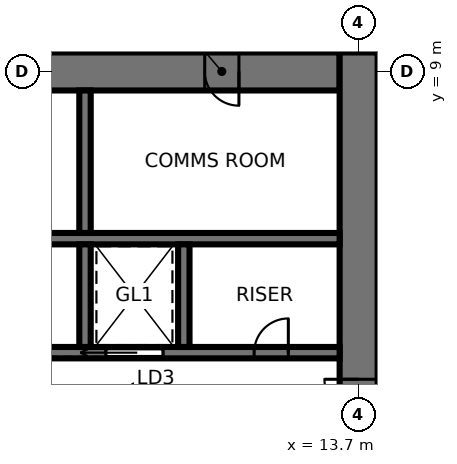
"""IFC4 building model, lengths in metres.
Left out: names, types, materials, properties, quantities, classifications, styles, units other than length and angle.
Written with IfcOpenShell. Run it as: python <this file> out.ifc"""

import sys

from ifc_helpers import new_model, si_unit, direction, frame, frame_2d, origin, place, context, subcontext, project, spatial, rectangle, extrude, element, fill, save


model = new_model("IFC4")
c1 = context("Model", 3, precision=1e-05, world=origin(), true_north=direction((0.0, 1.0)))
c2 = subcontext(c1, "Body", "Model", "MODEL_VIEW")
j1 = project(units=[si_unit("LENGTHUNIT", "METRE"), si_unit("PLANEANGLEUNIT", "RADIAN")], contexts=[c1])
p1 = place(None, origin())
s1 = spatial("IfcSite", under=j1, at=p1, CompositionType="ELEMENT")
p2 = place(p1, origin())
s2 = spatial("IfcBuilding", under=s1, at=p2, CompositionType="ELEMENT")
p3 = place(p2, frame((0.0, 0.0, 127.5)))
s3 = spatial("IfcBuildingStorey", under=s2, at=p3, CompositionType="ELEMENT", Elevation=127.5)
p4 = place(p3, frame((13.2, 9.0, 0.0), z_axis=(0.0, 0.0, 1.0), x_axis=(-1.0, 0.0, 0.0)))
e1 = element("IfcWall", 1, at=p4, inside=s3, PredefinedType="SHEAR", context=c2, shape_type="SweptSolid", body=[
    extrude(rectangle(XDim=26.4, YDim=1.0, at=frame_2d((13.2, 0.0))), origin(), (0.0, 0.0, 1.0), 3.9),
])
p5 = place(p4, frame((2.65, 0.0, 0.0)))
e2 = element("IfcOpeningElement", 2, at=p5, cuts=e1, PredefinedType="OPENING", context=c2, shape_type="SweptSolid", body=[
    extrude(rectangle(XDim=0.9, YDim=2.1, at=frame_2d((0.45, 1.05))), frame((0.0, 0.51, 0.0), z_axis=(0.0, -1.0, 0.0), x_axis=(1.0, 0.0, 0.0)), (0.0, 0.0, 1.0), 1.02),
])
p6 = place(p4, frame((9.5, 0.0, 0.0)))
e3 = element("IfcOpeningElement", 3, at=p6, cuts=e1, PredefinedType="OPENING", context=c2, shape_type="SweptSolid", body=[
    extrude(rectangle(XDim=0.9, YDim=2.1, at=frame_2d((0.45, 1.05))), frame((0.0, 0.51, 0.0), z_axis=(0.0, -1.0, 0.0), x_axis=(1.0, 0.0, 0.0)), (0.0, 0.0, 1.0), 1.02),
])
p7 = place(p4, frame((16.0, 0.0, 0.0)))
e4 = element("IfcOpeningElement", 4, at=p7, cuts=e1, PredefinedType="OPENING", context=c2, shape_type="SweptSolid", body=[
    extrude(rectangle(XDim=0.9, YDim=2.1, at=frame_2d((0.45, 1.05))), frame((0.0, 0.51, 0.0), z_axis=(0.0, -1.0, 0.0), x_axis=(1.0, 0.0, 0.0)), (0.0, 0.0, 1.0), 1.02),
])
p8 = place(p4, frame((21.25, 0.0, 0.0)))
e5 = element("IfcOpeningElement", 5, at=p8, cuts=e1, PredefinedType="OPENING", context=c2, shape_type="SweptSolid", body=[
    extrude(rectangle(XDim=0.9, YDim=2.1, at=frame_2d((0.45, 1.05))), frame((0.0, 0.51, 0.0), z_axis=(0.0, -1.0, 0.0), x_axis=(1.0, 0.0, 0.0)), (0.0, 0.0, 1.0), 1.02),
])
p9 = place(p4, frame((24.8, 0.0, 0.0)))
e6 = element("IfcOpeningElement", 6, at=p9, cuts=e1, PredefinedType="OPENING", context=c2, shape_type="SweptSolid", body=[
    extrude(rectangle(XDim=1.0, YDim=2.1, at=frame_2d((0.5, 1.05))), frame((0.0, 0.51, 0.0), z_axis=(0.0, -1.0, 0.0), x_axis=(1.0, 0.0, 0.0)), (0.0, 0.0, 1.0), 1.02),
])
p10 = place(p3, frame((13.7, -9.5, 0.0), z_axis=(0.0, 0.0, 1.0), x_axis=(0.0, 1.0, 0.0)))
e7 = element("IfcWall", 7, at=p10, inside=s3, PredefinedType="SHEAR", context=c2, shape_type="SweptSolid", body=[
    extrude(rectangle(XDim=19.0, YDim=1.0, at=frame_2d((9.5, 0.0))), origin(), (0.0, 0.0, 1.0), 3.9),
])
p11 = place(p10, frame((8.6, 0.0, 0.0)))
e8 = element("IfcOpeningElement", 8, at=p11, cuts=e7, PredefinedType="OPENING", context=c2, shape_type="SweptSolid", body=[
    extrude(rectangle(XDim=1.8, YDim=2.4, at=frame_2d((0.9, 1.2))), frame((0.0, 0.51, 0.0), z_axis=(0.0, -1.0, 0.0), x_axis=(1.0, 0.0, 0.0)), (0.0, 0.0, 1.0), 1.02),
])
p12 = place(p3, frame((-13.2, 1.6, 0.0), z_axis=(0.0, 0.0, 1.0), x_axis=(1.0, 0.0, 0.0)))
e9 = element("IfcWall", 9, at=p12, inside=s3, PredefinedType="SHEAR", context=c2, shape_type="SweptSolid", body=[
    extrude(rectangle(XDim=26.4, YDim=0.3, at=frame_2d((13.2, 0.0))), origin(), (0.0, 0.0, 1.0), 3.9),
])
p13 = place(p12, frame((0.25, 0.0, 0.0)))
e10 = element("IfcOpeningElement", 10, at=p13, cuts=e9, PredefinedType="OPENING", context=c2, shape_type="SweptSolid", body=[
    extrude(rectangle(XDim=1.0, YDim=2.1, at=frame_2d((0.5, 1.05))), frame((0.0, 0.16, 0.0), z_axis=(0.0, -1.0, 0.0), x_axis=(1.0, 0.0, 0.0)), (0.0, 0.0, 1.0), 0.32),
])
p14 = place(p12, frame((20.25, 0.0, 0.0)))
e11 = element("IfcOpeningElement", 11, at=p14, cuts=e9, PredefinedType="OPENING", context=c2, shape_type="SweptSolid", body=[
    extrude(rectangle(XDim=1.5, YDim=2.4, at=frame_2d((0.75, 1.2))), frame((0.0, 0.16, 0.0), z_axis=(0.0, -1.0, 0.0), x_axis=(1.0, 0.0, 0.0)), (0.0, 0.0, 1.0), 0.32),
])
p15 = place(p12, frame((7.55, 0.0, 0.0)))
e12 = element("IfcOpeningElement", 12, at=p15, cuts=e9, PredefinedType="OPENING", context=c2, shape_type="SweptSolid", body=[
    extrude(rectangle(XDim=0.9, YDim=2.1, at=frame_2d((0.45, 1.05))), frame((0.0, 0.16, 0.0), z_axis=(0.0, -1.0, 0.0), x_axis=(1.0, 0.0, 0.0)), (0.0, 0.0, 1.0), 0.32),
])
p16 = place(p12, frame((10.15, 0.0, 0.0)))
e13 = element("IfcOpeningElement", 13, at=p16, cuts=e9, PredefinedType="OPENING", context=c2, shape_type="SweptSolid", body=[
    extrude(rectangle(XDim=0.9, YDim=2.1, at=frame_2d((0.45, 1.05))), frame((0.0, 0.16, 0.0), z_axis=(0.0, -1.0, 0.0), x_axis=(1.0, 0.0, 0.0)), (0.0, 0.0, 1.0), 0.32),
])
p17 = place(p12, frame((12.75, 0.0, 0.0)))
e14 = element("IfcOpeningElement", 14, at=p17, cuts=e9, PredefinedType="OPENING", context=c2, shape_type="SweptSolid", body=[
    extrude(rectangle(XDim=0.9, YDim=2.1, at=frame_2d((0.45, 1.05))), frame((0.0, 0.16, 0.0), z_axis=(0.0, -1.0, 0.0), x_axis=(1.0, 0.0, 0.0)), (0.0, 0.0, 1.0), 0.32),
])
p18 = place(p12, frame((24.15, 0.0, 0.0)))
e15 = element("IfcOpeningElement", 15, at=p18, cuts=e9, PredefinedType="OPENING", context=c2, shape_type="SweptSolid", body=[
    extrude(rectangle(XDim=0.9, YDim=2.1, at=frame_2d((0.45, 1.05))), frame((0.0, 0.16, 0.0), z_axis=(0.0, -1.0, 0.0), x_axis=(1.0, 0.0, 0.0)), (0.0, 0.0, 1.0), 0.32),
])
p19 = place(p3, frame((-13.2, 4.6, 0.0), z_axis=(0.0, 0.0, 1.0), x_axis=(1.0, 0.0, 0.0)))
e16 = element("IfcWall", 16, at=p19, inside=s3, PredefinedType="SHEAR", context=c2, shape_type="SweptSolid", body=[
    extrude(rectangle(XDim=26.4, YDim=0.3, at=frame_2d((13.2, 0.0))), origin(), (0.0, 0.0, 1.0), 3.9),
])
p20 = place(p3, frame((6.5, 1.75, 0.0), z_axis=(0.0, 0.0, 1.0), x_axis=(0.0, 1.0, 0.0)))
e17 = element("IfcWall", 17, at=p20, inside=s3, PredefinedType="SHEAR", context=c2, shape_type="SweptSolid", body=[
    extrude(rectangle(XDim=2.7, YDim=0.3, at=frame_2d((1.35, 0.0))), origin(), (0.0, 0.0, 1.0), 3.9),
])
p21 = place(p3, frame((6.5, 4.75, 0.0), z_axis=(0.0, 0.0, 1.0), x_axis=(0.0, 1.0, 0.0)))
e18 = element("IfcWall", 18, at=p21, inside=s3, PredefinedType="SHEAR", context=c2, shape_type="SweptSolid", body=[
    extrude(rectangle(XDim=3.75, YDim=0.3, at=frame_2d((1.875, 0.0))), origin(), (0.0, 0.0, 1.0), 3.9),
])
p22 = place(p3, frame((9.1, 1.75, 0.0), z_axis=(0.0, 0.0, 1.0), x_axis=(0.0, 1.0, 0.0)))
e19 = element("IfcWall", 19, at=p22, inside=s3, PredefinedType="SHEAR", context=c2, shape_type="SweptSolid", body=[
    extrude(rectangle(XDim=2.7, YDim=0.3, at=frame_2d((1.35, 0.0))), origin(), (0.0, 0.0, 1.0), 3.9),
])
p23 = place(p11, origin())
e20 = element("IfcDoor", 20, at=p23, inside=s3, OperationType="DOUBLE_DOOR_SINGLE_SWING", PredefinedType="DOOR", context=c2, shape_type="SweptSolid", body=[
    extrude(rectangle(XDim=1.72, YDim=2.36, at=frame_2d((0.9, 1.18))), frame((0.0, 0.025, 0.0), z_axis=(0.0, -1.0, 0.0), x_axis=(1.0, 0.0, 0.0)), (0.0, 0.0, 1.0), 0.05),
    extrude(rectangle(XDim=0.04, YDim=2.4, at=frame_2d((0.02, 1.2))), frame((0.0, 0.25, 0.0), z_axis=(0.0, -1.0, 0.0), x_axis=(1.0, 0.0, 0.0)), (0.0, 0.0, 1.0), 0.5),
    extrude(rectangle(XDim=0.04, YDim=2.4, at=frame_2d((1.78, 1.2))), frame((0.0, 0.25, 0.0), z_axis=(0.0, -1.0, 0.0), x_axis=(1.0, 0.0, 0.0)), (0.0, 0.0, 1.0), 0.5),
    extrude(rectangle(XDim=1.72, YDim=0.04, at=frame_2d((0.9, 2.38))), frame((0.0, 0.25, 0.0), z_axis=(0.0, -1.0, 0.0), x_axis=(1.0, 0.0, 0.0)), (0.0, 0.0, 1.0), 0.5),
])
fill(e8, e20)
p24 = place(p14, origin())
e21 = element("IfcDoor", 21, at=p24, inside=s3, OperationType="SLIDING_TO_LEFT", PredefinedType="DOOR", context=c2, shape_type="SweptSolid", body=[
    extrude(rectangle(XDim=1.5, YDim=2.4, at=frame_2d((0.75, 1.2))), frame((0.0, 0.025, 0.0), z_axis=(0.0, -1.0, 0.0), x_axis=(1.0, 0.0, 0.0)), (0.0, 0.0, 1.0), 0.05),
])
fill(e11, e21)
p25 = place(p18, origin())
e22 = element("IfcDoor", 22, at=p25, inside=s3, OperationType="SINGLE_SWING_RIGHT", PredefinedType="DOOR", context=c2, shape_type="SweptSolid", body=[
    extrude(rectangle(XDim=0.9, YDim=2.1, at=frame_2d((0.45, 1.05))), frame((0.0, 0.025, 0.0), z_axis=(0.0, -1.0, 0.0), x_axis=(1.0, 0.0, 0.0)), (0.0, 0.0, 1.0), 0.05),
])
fill(e15, e22)
p26 = place(p5, origin())
e23 = element("IfcDoor", 23, at=p26, inside=s3, OperationType="SINGLE_SWING_LEFT", PredefinedType="DOOR", context=c2, shape_type="SweptSolid", body=[
    extrude(rectangle(XDim=0.82, YDim=2.06, at=frame_2d((0.45, 1.03))), frame((0.0, 0.025, 0.0), z_axis=(0.0, -1.0, 0.0), x_axis=(1.0, 0.0, 0.0)), (0.0, 0.0, 1.0), 0.05),
    extrude(rectangle(XDim=0.04, YDim=2.1, at=frame_2d((0.02, 1.05))), frame((0.0, 0.25, 0.0), z_axis=(0.0, -1.0, 0.0), x_axis=(1.0, 0.0, 0.0)), (0.0, 0.0, 1.0), 0.5),
    extrude(rectangle(XDim=0.04, YDim=2.1, at=frame_2d((0.88, 1.05))), frame((0.0, 0.25, 0.0), z_axis=(0.0, -1.0, 0.0), x_axis=(1.0, 0.0, 0.0)), (0.0, 0.0, 1.0), 0.5),
    extrude(rectangle(XDim=0.82, YDim=0.04, at=frame_2d((0.45, 2.08))), frame((0.0, 0.25, 0.0), z_axis=(0.0, -1.0, 0.0), x_axis=(1.0, 0.0, 0.0)), (0.0, 0.0, 1.0), 0.5),
])
fill(e2, e23)
save(model, sys.argv[1])
